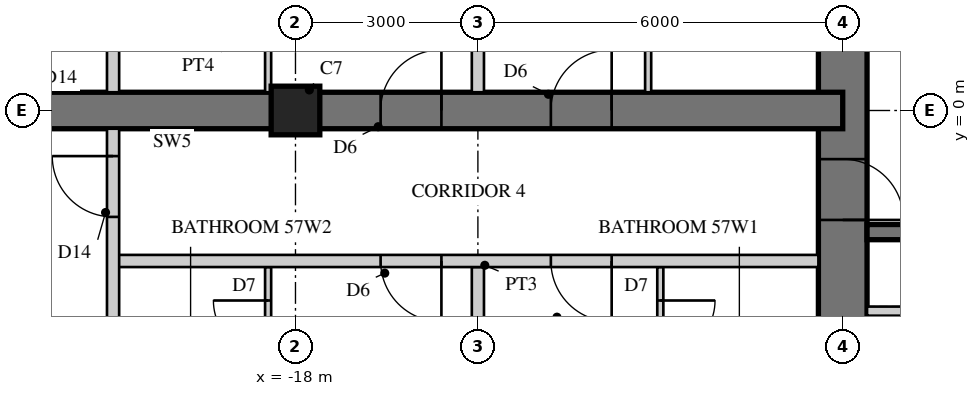
"""IFC4 building model, lengths in metres.
Left out: names, types, materials, properties, quantities, classifications, styles, units other than length and angle.
Written with IfcOpenShell. Run it as: python <this file> out.ifc"""

import sys

from ifc_helpers import new_model, si_unit, direction, frame, frame_2d, origin, origin_2d, place, context, subcontext, project, spatial, rectangle, extrude, element, fill, save


model = new_model("IFC4")
c1 = context("Model", 3, precision=1e-05, world=origin(), true_north=direction((0.0, 1.0)))
c2 = subcontext(c1, "Body", "Model", "MODEL_VIEW")
j1 = project(units=[si_unit("LENGTHUNIT", "METRE"), si_unit("PLANEANGLEUNIT", "RADIAN")], contexts=[c1])
p1 = place(None, origin())
s1 = spatial("IfcSite", under=j1, at=p1, CompositionType="ELEMENT")
p2 = place(p1, origin())
s2 = spatial("IfcBuilding", under=s1, at=p2, CompositionType="ELEMENT")
p3 = place(p2, frame((0.0, 0.0, 225.5)))
s3 = spatial("IfcBuildingStorey", under=s2, at=p3, CompositionType="ELEMENT", Elevation=225.5)
p4 = place(p3, frame((-9.0, 9.0, 0.0), z_axis=(0.0, 0.0, 1.0), x_axis=(0.0, -1.0, 0.0)))
e1 = element("IfcWall", 1, at=p4, inside=s3, PredefinedType="SHEAR", context=c2, shape_type="SweptSolid", body=[
    extrude(rectangle(XDim=18.0, YDim=0.8, at=frame_2d((9.0, 0.0))), origin(), (0.0, 0.0, 1.0), 3.4),
])
p5 = place(p4, frame((9.8, 0.0, 0.0)))
e2 = element("IfcOpeningElement", 2, at=p5, cuts=e1, PredefinedType="OPENING", context=c2, shape_type="SweptSolid", body=[
    extrude(rectangle(XDim=1.0, YDim=2.4, at=frame_2d((0.5, 1.2))), frame((0.0, 0.41, 0.0), z_axis=(0.0, -1.0, 0.0), x_axis=(1.0, 0.0, 0.0)), (0.0, 0.0, 1.0), 0.82),
])
p6 = place(p3, frame((-1.925, -2.0, 0.0), z_axis=(0.0, 0.0, 1.0), x_axis=(-1.0, 0.0, 0.0)))
e3 = element("IfcWall", 3, at=p6, inside=s3, PredefinedType="SHEAR", context=c2, shape_type="SweptSolid", body=[
    extrude(rectangle(XDim=6.675, YDim=0.25, at=frame_2d((3.337, 0.0))), origin(), (0.0, 0.0, 1.0), 3.4),
])
p7 = place(p3, frame((-1.925, -3.3, 0.0), z_axis=(0.0, 0.0, 1.0), x_axis=(-1.0, 0.0, 0.0)))
e4 = element("IfcWall", 4, at=p7, inside=s3, PredefinedType="PARTITIONING", context=c2, shape_type="SweptSolid", body=[
    extrude(rectangle(XDim=6.675, YDim=0.15, at=frame_2d((3.337, 0.0))), origin(), (0.0, 0.0, 1.0), 3.4),
])
p8 = place(p7, frame((0.075, 0.0, 0.0)))
e5 = element("IfcOpeningElement", 5, at=p8, cuts=e4, PredefinedType="OPENING", context=c2, shape_type="SweptSolid", body=[
    extrude(rectangle(XDim=0.8, YDim=2.1, at=frame_2d((0.4, 1.05))), frame((0.0, 0.085, 0.0), z_axis=(0.0, -1.0, 0.0), x_axis=(1.0, 0.0, 0.0)), (0.0, 0.0, 1.0), 0.17),
])
p9 = place(p7, frame((3.675, 0.0, 0.0)))
e6 = element("IfcOpeningElement", 6, at=p9, cuts=e4, PredefinedType="OPENING", context=c2, shape_type="SweptSolid", body=[
    extrude(rectangle(XDim=0.8, YDim=2.1, at=frame_2d((0.4, 1.05))), frame((0.0, 0.085, 0.0), z_axis=(0.0, -1.0, 0.0), x_axis=(1.0, 0.0, 0.0)), (0.0, 0.0, 1.0), 0.17),
])
p10 = place(p3, frame((-9.0, 0.0, 0.0), z_axis=(0.0, 0.0, 1.0), x_axis=(-1.0, 0.0, 0.0)))
e7 = element("IfcWall", 7, at=p10, inside=s3, PredefinedType="SHEAR", context=c2, shape_type="SweptSolid", body=[
    extrude(rectangle(XDim=18.0, YDim=0.6, at=frame_2d((9.0, 0.0))), origin(), (0.0, 0.0, 1.0), 3.4),
])
p11 = place(p10, frame((3.8, 0.0, 0.0)))
e8 = element("IfcOpeningElement", 8, at=p11, cuts=e7, PredefinedType="OPENING", context=c2, shape_type="SweptSolid", body=[
    extrude(rectangle(XDim=1.0, YDim=2.15, at=frame_2d((0.5, 1.075))), frame((0.0, 0.31, 0.0), z_axis=(0.0, -1.0, 0.0), x_axis=(1.0, 0.0, 0.0)), (0.0, 0.0, 1.0), 0.62),
])
p12 = place(p10, frame((6.6, 0.0, 0.0)))
e9 = element("IfcOpeningElement", 9, at=p12, cuts=e7, PredefinedType="OPENING", context=c2, shape_type="SweptSolid", body=[
    extrude(rectangle(XDim=1.0, YDim=2.15, at=frame_2d((0.5, 1.075))), frame((0.0, 0.31, 0.0), z_axis=(0.0, -1.0, 0.0), x_axis=(1.0, 0.0, 0.0)), (0.0, 0.0, 1.0), 0.62),
])
p13 = place(p10, frame((13.3, 0.0, 0.0)))
e10 = element("IfcOpeningElement", 10, at=p13, cuts=e7, PredefinedType="OPENING", context=c2, shape_type="SweptSolid", body=[
    extrude(rectangle(XDim=1.0, YDim=2.2, at=frame_2d((0.5, 1.1))), frame((0.0, 0.31, 0.0), z_axis=(0.0, -1.0, 0.0), x_axis=(1.0, 0.0, 0.0)), (0.0, 0.0, 1.0), 0.62),
])
p14 = place(p3, frame((-18.0, 0.0, 0.0), z_axis=(0.0, 0.0, 1.0), x_axis=(1.0, 0.0, 0.0)))
e11 = element("IfcColumn", 11, at=p14, inside=s3, PredefinedType="COLUMN", context=c2, shape_type="SweptSolid", body=[
    extrude(rectangle(XDim=0.8, YDim=0.8, at=origin_2d()), origin(), (0.0, 0.0, 1.0), 3.4),
])
p15 = place(p3, frame((-12.0, -2.575, 0.0), z_axis=(0.0, 0.0, 1.0), x_axis=(0.0, -1.0, 0.0)))
e12 = element("IfcWall", 12, at=p15, inside=s3, PredefinedType="PARTITIONING", context=c2, shape_type="SweptSolid", body=[
    extrude(rectangle(XDim=2.2, YDim=0.1, at=frame_2d((1.1, 0.0))), origin(), (0.0, 0.0, 1.0), 3.22),
])
p16 = place(p15, frame((0.55, 0.0, 0.0)))
e13 = element("IfcOpeningElement", 13, at=p16, cuts=e12, PredefinedType="OPENING", context=c2, shape_type="SweptSolid", body=[
    extrude(rectangle(XDim=0.9, YDim=2.1, at=frame_2d((0.45, 1.05))), frame((0.0, 0.06, 0.0), z_axis=(0.0, -1.0, 0.0), x_axis=(1.0, 0.0, 0.0)), (0.0, 0.0, 1.0), 0.12),
])
p17 = place(p3, frame((-12.2, 2.9, 0.0), z_axis=(0.0, 0.0, 1.0), x_axis=(0.0, -1.0, 0.0)))
e14 = element("IfcWall", 14, at=p17, inside=s3, PredefinedType="PARTITIONING", context=c2, shape_type="SweptSolid", body=[
    extrude(rectangle(XDim=2.6, YDim=0.1, at=frame_2d((1.3, 0.0))), origin(), (0.0, 0.0, 1.0), 3.22),
])
p18 = place(p17, frame((0.55, 0.0, 0.0)))
e15 = element("IfcOpeningElement", 15, at=p18, cuts=e14, PredefinedType="OPENING", context=c2, shape_type="SweptSolid", body=[
    extrude(rectangle(XDim=0.9, YDim=2.1, at=frame_2d((0.45, 1.05))), frame((0.0, 0.06, 0.0), z_axis=(0.0, -1.0, 0.0), x_axis=(1.0, 0.0, 0.0)), (0.0, 0.0, 1.0), 0.12),
])
p19 = place(p3, frame((-15.0, -2.575, 0.0), z_axis=(0.0, 0.0, 1.0), x_axis=(0.0, -1.0, 0.0)))
e16 = element("IfcWall", 16, at=p19, inside=s3, PredefinedType="SOLIDWALL", context=c2, shape_type="SweptSolid", body=[
    extrude(rectangle(XDim=6.025, YDim=0.2, at=frame_2d((3.013, 0.0))), origin(), (0.0, 0.0, 1.0), 2.52),
])
p20 = place(p3, frame((-15.0, 8.6, 0.0), z_axis=(0.0, 0.0, 1.0), x_axis=(0.0, -1.0, 0.0)))
e17 = element("IfcWall", 17, at=p20, inside=s3, PredefinedType="SOLIDWALL", context=c2, shape_type="SweptSolid", body=[
    extrude(rectangle(XDim=8.3, YDim=0.2, at=frame_2d((4.15, 0.0))), origin(), (0.0, 0.0, 1.0), 2.52),
])
p21 = place(p3, frame((-18.45, -2.575, 0.0), z_axis=(0.0, 0.0, 1.0), x_axis=(0.0, -1.0, 0.0)))
e18 = element("IfcWall", 18, at=p21, inside=s3, PredefinedType="PARTITIONING", context=c2, shape_type="SweptSolid", body=[
    extrude(rectangle(XDim=2.2, YDim=0.1, at=frame_2d((1.1, 0.0))), origin(), (0.0, 0.0, 1.0), 3.22),
])
p22 = place(p21, frame((0.55, 0.0, 0.0)))
e19 = element("IfcOpeningElement", 19, at=p22, cuts=e18, PredefinedType="OPENING", context=c2, shape_type="SweptSolid", body=[
    extrude(rectangle(XDim=0.9, YDim=2.1, at=frame_2d((0.45, 1.05))), frame((0.0, 0.06, 0.0), z_axis=(0.0, -1.0, 0.0), x_axis=(1.0, 0.0, 0.0)), (0.0, 0.0, 1.0), 0.12),
])
p23 = place(p3, frame((-18.45, 2.5, 0.0), z_axis=(0.0, 0.0, 1.0), x_axis=(0.0, -1.0, 0.0)))
e20 = element("IfcWall", 20, at=p23, inside=s3, PredefinedType="PARTITIONING", context=c2, shape_type="SweptSolid", body=[
    extrude(rectangle(XDim=2.2, YDim=0.1, at=frame_2d((1.1, 0.0))), origin(), (0.0, 0.0, 1.0), 3.22),
])
p24 = place(p23, frame((0.55, 0.0, 0.0)))
e21 = element("IfcOpeningElement", 21, at=p24, cuts=e20, PredefinedType="OPENING", context=c2, shape_type="SweptSolid", body=[
    extrude(rectangle(XDim=0.9, YDim=2.1, at=frame_2d((0.45, 1.05))), frame((0.0, 0.06, 0.0), z_axis=(0.0, -1.0, 0.0), x_axis=(1.0, 0.0, 0.0)), (0.0, 0.0, 1.0), 0.12),
])
p25 = place(p3, frame((-9.4, -2.475, 0.0), z_axis=(0.0, 0.0, 1.0), x_axis=(-1.0, 0.0, 0.0)))
e22 = element("IfcWall", 22, at=p25, inside=s3, PredefinedType="SOLIDWALL", context=c2, shape_type="SweptSolid", body=[
    extrude(rectangle(XDim=11.6, YDim=0.2, at=frame_2d((5.8, 0.0))), origin(), (0.0, 0.0, 1.0), 3.22),
])
p26 = place(p25, frame((3.4, 0.0, 0.0)))
e23 = element("IfcOpeningElement", 23, at=p26, cuts=e22, PredefinedType="OPENING", context=c2, shape_type="SweptSolid", body=[
    extrude(rectangle(XDim=1.0, YDim=2.15, at=frame_2d((0.5, 1.075))), frame((0.0, 0.11, 0.0), z_axis=(0.0, -1.0, 0.0), x_axis=(1.0, 0.0, 0.0)), (0.0, 0.0, 1.0), 0.22),
])
p27 = place(p25, frame((6.2, 0.0, 0.0)))
e24 = element("IfcOpeningElement", 24, at=p27, cuts=e22, PredefinedType="OPENING", context=c2, shape_type="SweptSolid", body=[
    extrude(rectangle(XDim=1.0, YDim=2.15, at=frame_2d((0.5, 1.075))), frame((0.0, 0.11, 0.0), z_axis=(0.0, -1.0, 0.0), x_axis=(1.0, 0.0, 0.0)), (0.0, 0.0, 1.0), 0.22),
])
p28 = place(p3, frame((-21.0, 9.0, 0.0), z_axis=(0.0, 0.0, 1.0), x_axis=(0.0, -1.0, 0.0)))
e25 = element("IfcWall", 25, at=p28, inside=s3, PredefinedType="SOLIDWALL", context=c2, shape_type="SweptSolid", body=[
    extrude(rectangle(XDim=8.7, YDim=0.2, at=frame_2d((4.35, 0.0))), origin(), (0.0, 0.0, 1.0), 2.67),
])
p29 = place(p3, frame((-21.0, -0.3, 0.0), z_axis=(0.0, 0.0, 1.0), x_axis=(0.0, -1.0, 0.0)))
e26 = element("IfcWall", 26, at=p29, inside=s3, PredefinedType="SOLIDWALL", context=c2, shape_type="SweptSolid", body=[
    extrude(rectangle(XDim=8.7, YDim=0.2, at=frame_2d((4.35, 0.0))), origin(), (0.0, 0.0, 1.0), 2.67),
])
p30 = place(p29, frame((0.45, 0.0, 0.0)))
e27 = element("IfcOpeningElement", 27, at=p30, cuts=e26, PredefinedType="OPENING", context=c2, shape_type="SweptSolid", body=[
    extrude(rectangle(XDim=1.0, YDim=2.2, at=frame_2d((0.5, 1.1))), frame((0.0, 0.11, 0.0), z_axis=(0.0, -1.0, 0.0), x_axis=(1.0, 0.0, 0.0)), (0.0, 0.0, 1.0), 0.22),
])
p31 = place(p16, origin())
e28 = element("IfcDoor", 28, at=p31, inside=s3, OperationType="SINGLE_SWING_LEFT", PredefinedType="DOOR", context=c2, shape_type="SweptSolid", body=[
    extrude(rectangle(XDim=0.9, YDim=2.1, at=frame_2d((0.45, 1.05))), frame((0.0, 0.025, 0.0), z_axis=(0.0, -1.0, 0.0), x_axis=(1.0, 0.0, 0.0)), (0.0, 0.0, 1.0), 0.05),
])
fill(e13, e28)
p32 = place(p22, frame((0.9, 0.0, 0.0), z_axis=(0.0, 0.0, 1.0), x_axis=(-1.0, 0.0, 0.0)))
e29 = element("IfcDoor", 29, at=p32, inside=s3, OperationType="SINGLE_SWING_RIGHT", PredefinedType="DOOR", context=c2, shape_type="SweptSolid", body=[
    extrude(rectangle(XDim=0.9, YDim=2.1, at=frame_2d((0.45, 1.05))), frame((0.0, 0.025, 0.0), z_axis=(0.0, -1.0, 0.0), x_axis=(1.0, 0.0, 0.0)), (0.0, 0.0, 1.0), 0.05),
])
fill(e19, e29)
p33 = place(p26, origin())
e30 = element("IfcDoor", 30, at=p33, inside=s3, OperationType="SINGLE_SWING_LEFT", PredefinedType="DOOR", context=c2, shape_type="SweptSolid", body=[
    extrude(rectangle(XDim=1.0, YDim=2.15, at=frame_2d((0.5, 1.075))), frame((0.0, 0.025, 0.0), z_axis=(0.0, -1.0, 0.0), x_axis=(1.0, 0.0, 0.0)), (0.0, 0.0, 1.0), 0.05),
])
fill(e23, e30)
p34 = place(p27, origin())
e31 = element("IfcDoor", 31, at=p34, inside=s3, OperationType="SINGLE_SWING_LEFT", PredefinedType="DOOR", context=c2, shape_type="SweptSolid", body=[
    extrude(rectangle(XDim=1.0, YDim=2.15, at=frame_2d((0.5, 1.075))), frame((0.0, 0.025, 0.0), z_axis=(0.0, -1.0, 0.0), x_axis=(1.0, 0.0, 0.0)), (0.0, 0.0, 1.0), 0.05),
])
fill(e24, e31)
p35 = place(p30, frame((1.0, 0.0, 0.0), z_axis=(0.0, 0.0, 1.0), x_axis=(-1.0, 0.0, 0.0)))
e32 = element("IfcDoor", 32, at=p35, inside=s3, OperationType="SINGLE_SWING_RIGHT", PredefinedType="DOOR", context=c2, shape_type="SweptSolid", body=[
    extrude(rectangle(XDim=1.0, YDim=2.2, at=frame_2d((0.5, 1.1))), frame((0.0, 0.025, 0.0), z_axis=(0.0, -1.0, 0.0), x_axis=(1.0, 0.0, 0.0)), (0.0, 0.0, 1.0), 0.05),
])
fill(e27, e32)
p36 = place(p11, frame((1.0, 0.0, 0.0), z_axis=(0.0, 0.0, 1.0), x_axis=(-1.0, 0.0, 0.0)))
e33 = element("IfcDoor", 33, at=p36, inside=s3, OperationType="SINGLE_SWING_RIGHT", PredefinedType="DOOR", context=c2, shape_type="SweptSolid", body=[
    extrude(rectangle(XDim=1.0, YDim=2.15, at=frame_2d((0.5, 1.075))), frame((0.0, 0.025, 0.0), z_axis=(0.0, -1.0, 0.0), x_axis=(1.0, 0.0, 0.0)), (0.0, 0.0, 1.0), 0.05),
])
fill(e8, e33)
p37 = place(p12, frame((1.0, 0.0, 0.0), z_axis=(0.0, 0.0, 1.0), x_axis=(-1.0, 0.0, 0.0)))
e34 = element("IfcDoor", 34, at=p37, inside=s3, OperationType="SINGLE_SWING_RIGHT", PredefinedType="DOOR", context=c2, shape_type="SweptSolid", body=[
    extrude(rectangle(XDim=1.0, YDim=2.15, at=frame_2d((0.5, 1.075))), frame((0.0, 0.025, 0.0), z_axis=(0.0, -1.0, 0.0), x_axis=(1.0, 0.0, 0.0)), (0.0, 0.0, 1.0), 0.05),
])
fill(e9, e34)
p38 = place(p5, origin())
e35 = element("IfcDoor", 35, at=p38, inside=s3, OperationType="SINGLE_SWING_RIGHT", PredefinedType="DOOR", context=c2, shape_type="SweptSolid", body=[
    extrude(rectangle(XDim=1.0, YDim=2.4, at=frame_2d((0.5, 1.2))), frame((0.0, 0.055, 0.0), z_axis=(0.0, -1.0, 0.0), x_axis=(1.0, 0.0, 0.0)), (0.0, 0.0, 1.0), 0.05),
])
fill(e2, e35)
save(model, sys.argv[1])
